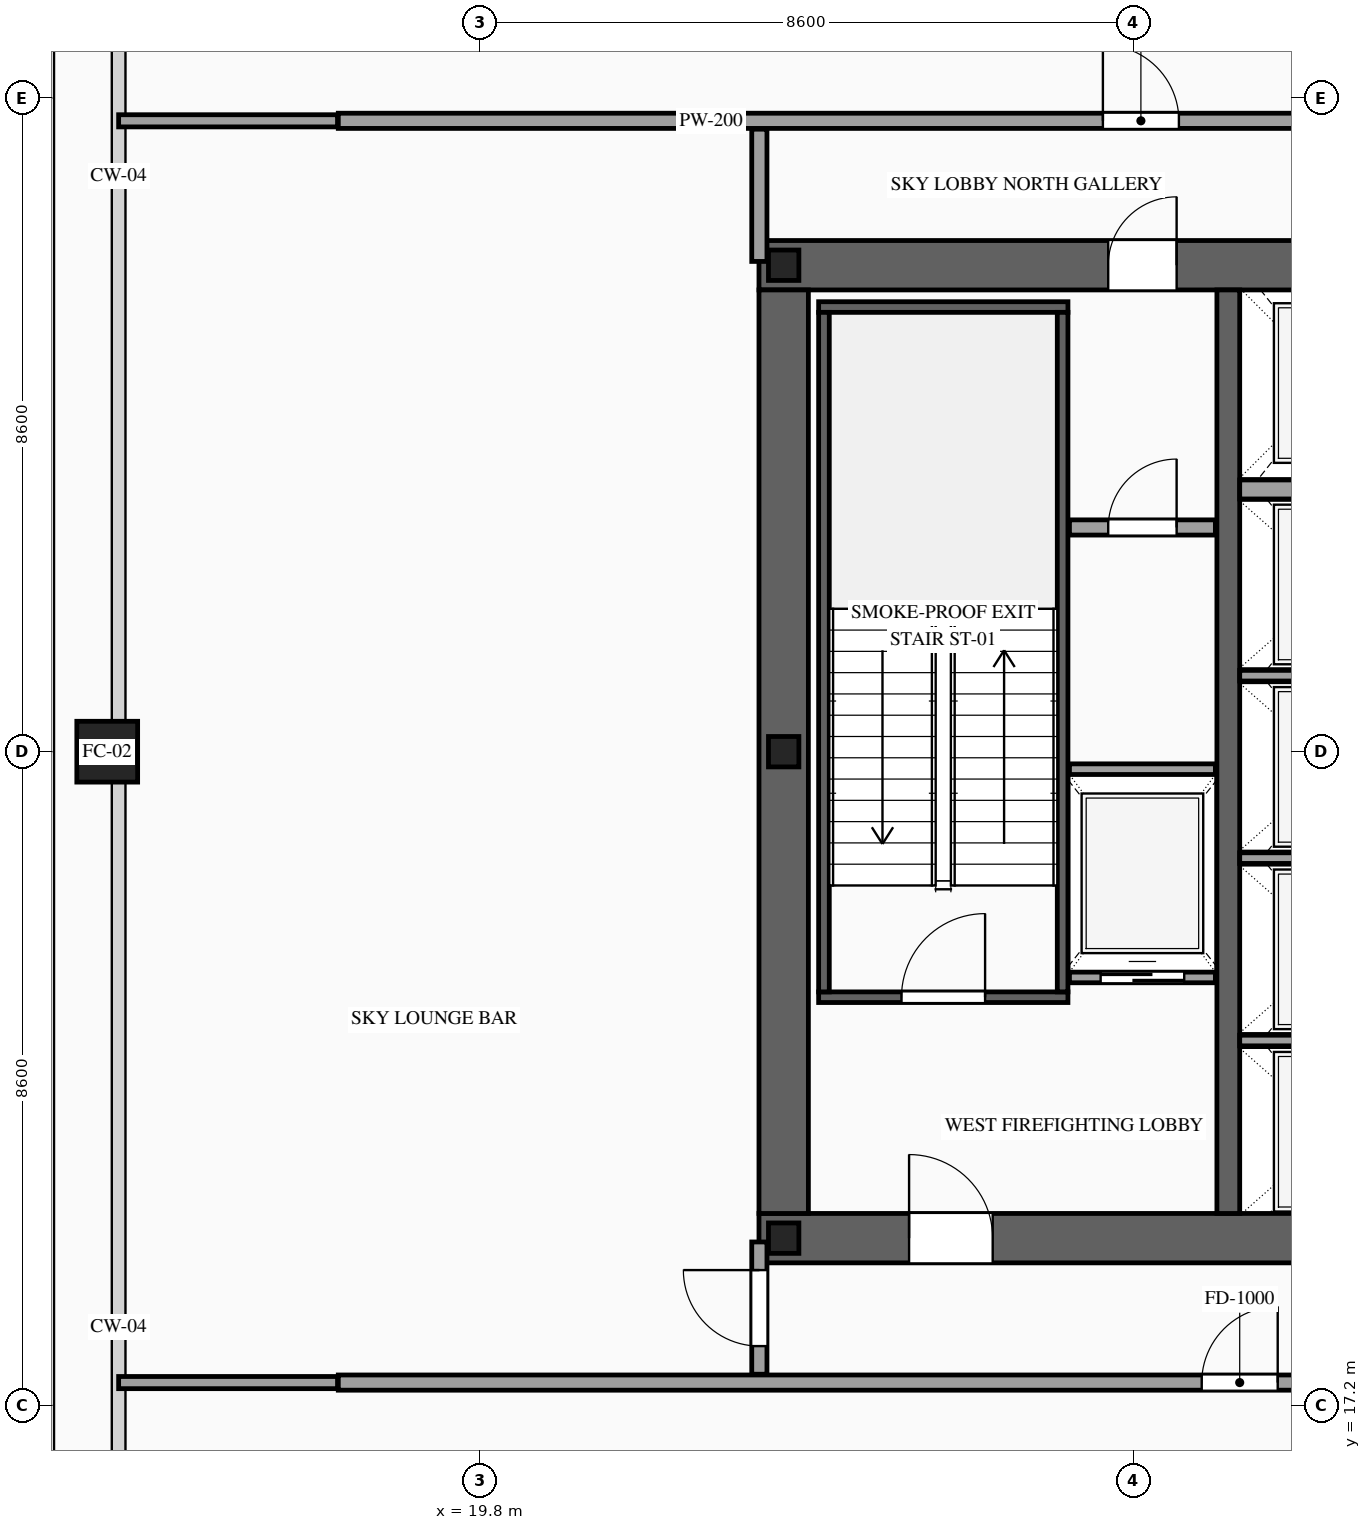
"""IFC4 building model, lengths in metres.
Left out: names, types, materials, properties, quantities, classifications, styles, units other than length and angle.
Written with IfcOpenShell. Run it as: python <this file> out.ifc"""

import sys

from ifc_helpers import new_model, si_unit, direction, frame, frame_2d, origin, origin_2d, place, context, subcontext, project, spatial, rectangle, hollow_rectangle, i_section, extrude, source, transform, mapped, element, fill, save


model = new_model("IFC4")
c1 = context("Model", 3, precision=1e-05, world=origin(), true_north=direction((0.0, 1.0)))
c2 = subcontext(c1, "Body", "Model", "MODEL_VIEW")
j1 = project(units=[si_unit("LENGTHUNIT", "METRE"), si_unit("PLANEANGLEUNIT", "RADIAN")], contexts=[c1])
p1 = place(None, origin())
s1 = spatial("IfcSite", under=j1, at=p1, CompositionType="ELEMENT")
p2 = place(p1, origin())
s2 = spatial("IfcBuilding", under=s1, at=p2, CompositionType="ELEMENT")
p3 = place(p2, frame((0.0, 0.0, 166.8)))
s3 = spatial("IfcBuildingStorey", under=s2, at=p3, CompositionType="ELEMENT", Elevation=166.8)
p4 = place(p3, frame((23.475, 19.4, 0.0), z_axis=(0.0, 0.0, 1.0), x_axis=(1.0, 0.0, 0.0)))
e1 = element("IfcWall", 1, at=p4, inside=s3, PredefinedType="SHEAR", context=c2, shape_type="SweptSolid", body=[
    extrude(rectangle(XDim=27.05, YDim=0.65, at=frame_2d((13.525, 0.0))), origin(), (0.0, 0.0, 1.0), 4.8),
])
p5 = place(p4, frame((1.975, 0.0, 0.0)))
e2 = element("IfcOpeningElement", 2, at=p5, cuts=e1, PredefinedType="OPENING", context=c2, shape_type="SweptSolid", body=[
    extrude(rectangle(XDim=1.1, YDim=2.2, at=frame_2d((0.55, 1.1))), frame((0.0, 0.34, 0.0), z_axis=(0.0, -1.0, 0.0), x_axis=(1.0, 0.0, 0.0)), (0.0, 0.0, 1.0), 0.68),
])
p6 = place(p4, frame((9.875, 0.0, 0.0)))
e3 = element("IfcOpeningElement", 3, at=p6, cuts=e1, PredefinedType="OPENING", context=c2, shape_type="SweptSolid", body=[
    extrude(rectangle(XDim=1.1, YDim=2.2, at=frame_2d((0.55, 1.1))), frame((0.0, 0.34, 0.0), z_axis=(0.0, -1.0, 0.0), x_axis=(1.0, 0.0, 0.0)), (0.0, 0.0, 1.0), 0.68),
])
p7 = place(p4, frame((23.075, 0.0, 0.0)))
e4 = element("IfcOpeningElement", 4, at=p7, cuts=e1, PredefinedType="OPENING", context=c2, shape_type="SweptSolid", body=[
    extrude(rectangle(XDim=1.1, YDim=2.2, at=frame_2d((0.55, 1.1))), frame((0.0, 0.34, 0.0), z_axis=(0.0, -1.0, 0.0), x_axis=(1.0, 0.0, 0.0)), (0.0, 0.0, 1.0), 0.68),
])
p8 = place(p4, frame((19.695, 0.0, 0.0)))
e5 = element("IfcOpeningElement", 5, at=p8, cuts=e1, PredefinedType="OPENING", context=c2, shape_type="SweptSolid", body=[
    extrude(rectangle(XDim=0.9, YDim=2.15, at=frame_2d((0.45, 1.075))), frame((0.0, 0.34, 0.0), z_axis=(0.0, -1.0, 0.0), x_axis=(1.0, 0.0, 0.0)), (0.0, 0.0, 1.0), 0.68),
])
p9 = place(p4, frame((18.255, 0.0, 0.0)))
e6 = element("IfcOpeningElement", 6, at=p9, cuts=e1, PredefinedType="OPENING", context=c2, shape_type="SweptSolid", body=[
    extrude(rectangle(XDim=0.9, YDim=2.15, at=frame_2d((0.45, 1.075))), frame((0.0, 0.34, 0.0), z_axis=(0.0, -1.0, 0.0), x_axis=(1.0, 0.0, 0.0)), (0.0, 0.0, 1.0), 0.68),
])
p10 = place(p3, frame((23.475, 32.2, 0.0), z_axis=(0.0, 0.0, 1.0), x_axis=(1.0, 0.0, 0.0)))
e7 = element("IfcWall", 7, at=p10, inside=s3, PredefinedType="SHEAR", context=c2, shape_type="SweptSolid", body=[
    extrude(rectangle(XDim=27.05, YDim=0.65, at=frame_2d((13.525, 0.0))), origin(), (0.0, 0.0, 1.0), 4.8),
])
p11 = place(p10, frame((4.595, 0.0, 0.0)))
e8 = element("IfcOpeningElement", 8, at=p11, cuts=e7, PredefinedType="OPENING", context=c2, shape_type="SweptSolid", body=[
    extrude(rectangle(XDim=0.9, YDim=2.15, at=frame_2d((0.45, 1.075))), frame((0.0, 0.34, 0.0), z_axis=(0.0, -1.0, 0.0), x_axis=(1.0, 0.0, 0.0)), (0.0, 0.0, 1.0), 0.68),
])
p12 = place(p10, frame((9.875, 0.0, 0.0)))
e9 = element("IfcOpeningElement", 9, at=p12, cuts=e7, PredefinedType="OPENING", context=c2, shape_type="SweptSolid", body=[
    extrude(rectangle(XDim=1.1, YDim=2.2, at=frame_2d((0.55, 1.1))), frame((0.0, 0.34, 0.0), z_axis=(0.0, -1.0, 0.0), x_axis=(1.0, 0.0, 0.0)), (0.0, 0.0, 1.0), 0.68),
])
p13 = place(p10, frame((15.725, 0.0, 0.0)))
e10 = element("IfcOpeningElement", 10, at=p13, cuts=e7, PredefinedType="OPENING", context=c2, shape_type="SweptSolid", body=[
    extrude(rectangle(XDim=1.1, YDim=2.2, at=frame_2d((0.55, 1.1))), frame((0.0, 0.34, 0.0), z_axis=(0.0, -1.0, 0.0), x_axis=(1.0, 0.0, 0.0)), (0.0, 0.0, 1.0), 0.68),
])
p14 = place(p10, frame((18.825, 0.0, 0.0)))
e11 = element("IfcOpeningElement", 11, at=p14, cuts=e7, PredefinedType="OPENING", context=c2, shape_type="SweptSolid", body=[
    extrude(rectangle(XDim=1.1, YDim=2.2, at=frame_2d((0.55, 1.1))), frame((0.0, 0.34, 0.0), z_axis=(0.0, -1.0, 0.0), x_axis=(1.0, 0.0, 0.0)), (0.0, 0.0, 1.0), 0.68),
])
m1 = source(origin(), c2, "Body", "SweptSolid", [
    extrude(rectangle(XDim=12.15, YDim=0.65, at=frame_2d((6.075, 0.0))), origin(), (0.0, 0.0, 1.0), 4.8),
])
p15 = place(p3, frame((23.8, 19.725, 0.0), z_axis=(0.0, 0.0, 1.0), x_axis=(0.0, 1.0, 0.0)))
e12 = element("IfcWall", 12, at=p15, inside=s3, PredefinedType="SHEAR", context=c2, shape_type="MappedRepresentation", body=[
    mapped(m1, transform((0.0, 0.0, 0.0), scale=1.0)),
])
m2 = source(origin(), c2, "Body", "SweptSolid", [
    extrude(rectangle(XDim=12.15, YDim=0.3, at=frame_2d((6.075, 0.0))), origin(), (0.0, 0.0, 1.0), 4.8),
])
p16 = place(p3, frame((29.65, 19.725, 0.0), z_axis=(0.0, 0.0, 1.0), x_axis=(0.0, 1.0, 0.0)))
e13 = element("IfcWall", 13, at=p16, inside=s3, PredefinedType="SOLIDWALL", context=c2, shape_type="MappedRepresentation", body=[
    mapped(m2, transform((0.0, 0.0, 0.0), scale=1.0)),
])
m3 = source(origin(), c2, "Body", "SweptSolid", [
    extrude(i_section(OverallWidth=0.4, OverallDepth=0.4, WebThickness=0.013, FlangeThickness=0.021, at=origin_2d()), origin(), (0.0, 0.0, 1.0), 4.8),
])
for number, where, z_axis, x_axis in (
    (14, (23.8, 19.4, 0.0), (0.0, 0.0, 1.0), (1.0, 0.0, 0.0)),
    (15, (23.8, 25.8, 0.0), (0.0, 0.0, 1.0), (1.0, 0.0, 0.0)),
    (16, (23.8, 32.2, 0.0), (0.0, 0.0, 1.0), (1.0, 0.0, 0.0)),
):
    element("IfcColumn", number, at=place(p3, frame(where, z_axis=z_axis, x_axis=x_axis)), inside=s3, PredefinedType="COLUMN", context=c2, shape_type="MappedRepresentation", body=[
        mapped(m3, transform((0.0, 0.0, 0.0), scale=1.0)),
    ])
m4 = source(origin(), c2, "Body", "SweptSolid", [
    extrude(hollow_rectangle(XDim=0.8, YDim=0.8, WallThickness=0.036, at=origin_2d()), origin(), (0.0, 0.0, 1.0), 4.8),
])
p17 = place(p3, frame((14.9, 25.8, 0.0), z_axis=(0.0, 0.0, 1.0), x_axis=(1.0, 0.0, 0.0)))
e17 = element("IfcColumn", 17, at=p17, inside=s3, PredefinedType="COLUMN", context=c2, shape_type="MappedRepresentation", body=[
    mapped(m4, transform((0.0, 0.0, 0.0), scale=1.0)),
])
p18 = place(p3, frame((27.56, 22.83, 0.0), z_axis=(0.0, 0.0, 1.0), x_axis=(1.0, 0.0, 0.0)))
e18 = element("IfcWall", 18, at=p18, inside=s3, PredefinedType="SOLIDWALL", context=c2, shape_type="SweptSolid", body=[
    extrude(rectangle(XDim=1.92, YDim=0.14, at=frame_2d((0.96, 0.0))), origin(), (0.0, 0.0, 1.0), 4.5),
])
p19 = place(p18, frame((0.41, 0.0, 0.0)))
e19 = element("IfcOpeningElement", 19, at=p19, cuts=e18, PredefinedType="OPENING", context=c2, shape_type="SweptSolid", body=[
    extrude(rectangle(XDim=1.1, YDim=2.2, at=frame_2d((0.55, 1.1))), frame((0.0, 0.085, 0.0), z_axis=(0.0, -1.0, 0.0), x_axis=(1.0, 0.0, 0.0)), (0.0, 0.0, 1.0), 0.17),
])
m5 = source(origin(), c2, "Body", "SweptSolid", [
    extrude(rectangle(XDim=1.92, YDim=0.14, at=frame_2d((0.96, 0.0))), origin(), (0.0, 0.0, 1.0), 4.5),
])
p20 = place(p3, frame((27.56, 25.57, 0.0), z_axis=(0.0, 0.0, 1.0), x_axis=(1.0, 0.0, 0.0)))
e20 = element("IfcWall", 20, at=p20, inside=s3, PredefinedType="SOLIDWALL", context=c2, shape_type="MappedRepresentation", body=[
    mapped(m5, transform((0.0, 0.0, 0.0), scale=1.0)),
])
m6 = source(origin(), c2, "Body", "SweptSolid", [
    extrude(rectangle(XDim=2.5, YDim=0.14, at=frame_2d((1.25, 0.0))), origin(), (0.0, 0.0, 1.0), 4.5),
])
for number, where, z_axis, x_axis in (
    (21, (29.8, 22.0, 0.0), (0.0, 0.0, 1.0), (1.0, 0.0, 0.0)),
    (22, (29.8, 24.4, 0.0), (0.0, 0.0, 1.0), (1.0, 0.0, 0.0)),
    (23, (29.8, 26.8, 0.0), (0.0, 0.0, 1.0), (1.0, 0.0, 0.0)),
):
    element("IfcWall", number, at=place(p3, frame(where, z_axis=z_axis, x_axis=x_axis)), inside=s3, PredefinedType="SOLIDWALL", context=c2, shape_type="MappedRepresentation", body=[
        mapped(m6, transform((0.0, 0.0, 0.0), scale=1.0)),
    ])
m7 = source(origin(), c2, "Body", "SweptSolid", [
    extrude(rectangle(XDim=2.5, YDim=0.25, at=frame_2d((1.25, 0.0))), origin(), (0.0, 0.0, 1.0), 4.5),
])
p21 = place(p3, frame((29.8, 29.25, 0.0), z_axis=(0.0, 0.0, 1.0), x_axis=(1.0, 0.0, 0.0)))
e24 = element("IfcWall", 24, at=p21, inside=s3, PredefinedType="SOLIDWALL", context=c2, shape_type="MappedRepresentation", body=[
    mapped(m7, transform((0.0, 0.0, 0.0), scale=1.0)),
])
p22 = place(p3, frame((24.26, 22.57, 0.0), z_axis=(0.0, 0.0, 1.0), x_axis=(1.0, 0.0, 0.0)))
e25 = element("IfcWall", 25, at=p22, inside=s3, PredefinedType="SOLIDWALL", context=c2, shape_type="SweptSolid", body=[
    extrude(rectangle(XDim=3.28, YDim=0.14, at=frame_2d((1.64, 0.0))), origin(), (0.0, 0.0, 1.0), 4.5),
])
p23 = place(p22, frame((1.09, 0.0, 0.0)))
e26 = element("IfcOpeningElement", 26, at=p23, cuts=e25, PredefinedType="OPENING", context=c2, shape_type="SweptSolid", body=[
    extrude(rectangle(XDim=1.1, YDim=2.2, at=frame_2d((0.55, 1.1))), frame((0.0, 0.085, 0.0), z_axis=(0.0, -1.0, 0.0), x_axis=(1.0, 0.0, 0.0)), (0.0, 0.0, 1.0), 0.17),
])
m8 = source(origin(), c2, "Body", "SweptSolid", [
    extrude(rectangle(XDim=3.28, YDim=0.14, at=frame_2d((1.64, 0.0))), origin(), (0.0, 0.0, 1.0), 4.5),
])
p24 = place(p3, frame((24.26, 31.65, 0.0), z_axis=(0.0, 0.0, 1.0), x_axis=(1.0, 0.0, 0.0)))
e27 = element("IfcWall", 27, at=p24, inside=s3, PredefinedType="SOLIDWALL", context=c2, shape_type="MappedRepresentation", body=[
    mapped(m8, transform((0.0, 0.0, 0.0), scale=1.0)),
])
m9 = source(origin(), c2, "Body", "SweptSolid", [
    extrude(rectangle(XDim=8.94, YDim=0.14, at=frame_2d((4.47, 0.0))), origin(), (0.0, 0.0, 1.0), 4.5),
])
for number, where, z_axis, x_axis in (
    (28, (24.33, 22.64, 0.0), (0.0, 0.0, 1.0), (0.0, 1.0, 0.0)),
    (29, (27.47, 22.64, 0.0), (0.0, 0.0, 1.0), (0.0, 1.0, 0.0)),
):
    element("IfcWall", number, at=place(p3, frame(where, z_axis=z_axis, x_axis=x_axis)), inside=s3, PredefinedType="SOLIDWALL", context=c2, shape_type="MappedRepresentation", body=[
        mapped(m9, transform((0.0, 0.0, 0.0), scale=1.0)),
    ])
p25 = place(p3, frame((27.56, 28.75, 0.0), z_axis=(0.0, 0.0, 1.0), x_axis=(1.0, 0.0, 0.0)))
e30 = element("IfcWall", 30, at=p25, inside=s3, PredefinedType="PARTITIONING", context=c2, shape_type="SweptSolid", body=[
    extrude(rectangle(XDim=1.92, YDim=0.2, at=frame_2d((0.96, 0.0))), origin(), (0.0, 0.0, 1.0), 4.5),
])
p26 = place(p25, frame((0.51, 0.0, 0.0)))
e31 = element("IfcOpeningElement", 31, at=p26, cuts=e30, PredefinedType="OPENING", context=c2, shape_type="SweptSolid", body=[
    extrude(rectangle(XDim=0.9, YDim=2.15, at=frame_2d((0.45, 1.075))), frame((0.0, 0.115, 0.0), z_axis=(0.0, -1.0, 0.0), x_axis=(1.0, 0.0, 0.0)), (0.0, 0.0, 1.0), 0.23),
])
p27 = place(p3, frame((17.94, 17.5, 0.0), z_axis=(0.0, 0.0, 1.0), x_axis=(1.0, 0.0, 0.0)))
e32 = element("IfcWall", 32, at=p27, inside=s3, PredefinedType="PARTITIONING", context=c2, shape_type="SweptSolid", body=[
    extrude(rectangle(XDim=18.86, YDim=0.2, at=frame_2d((9.43, 0.0))), origin(), (0.0, 0.0, 1.0), 4.5),
])
p28 = place(p27, frame((11.36, 0.0, 0.0)))
e33 = element("IfcOpeningElement", 33, at=p28, cuts=e32, PredefinedType="OPENING", context=c2, shape_type="SweptSolid", body=[
    extrude(rectangle(XDim=1.0, YDim=2.2, at=frame_2d((0.5, 1.1))), frame((0.0, 0.115, 0.0), z_axis=(0.0, -1.0, 0.0), x_axis=(1.0, 0.0, 0.0)), (0.0, 0.0, 1.0), 0.23),
])
p29 = place(p3, frame((23.48, 17.61, 0.0), z_axis=(0.0, 0.0, 1.0), x_axis=(0.0, 1.0, 0.0)))
e34 = element("IfcWall", 34, at=p29, inside=s3, PredefinedType="PARTITIONING", context=c2, shape_type="SweptSolid", body=[
    extrude(rectangle(XDim=1.74, YDim=0.2, at=frame_2d((0.87, 0.0))), origin(), (0.0, 0.0, 1.0), 4.5),
])
p30 = place(p29, frame((0.37, 0.0, 0.0)))
e35 = element("IfcOpeningElement", 35, at=p30, cuts=e34, PredefinedType="OPENING", context=c2, shape_type="SweptSolid", body=[
    extrude(rectangle(XDim=1.0, YDim=2.2, at=frame_2d((0.5, 1.1))), frame((0.0, 0.115, 0.0), z_axis=(0.0, -1.0, 0.0), x_axis=(1.0, 0.0, 0.0)), (0.0, 0.0, 1.0), 0.23),
])
m10 = source(origin(), c2, "Body", "SweptSolid", [
    extrude(rectangle(XDim=1.74, YDim=0.2, at=frame_2d((0.87, 0.0))), origin(), (0.0, 0.0, 1.0), 4.5),
])
p31 = place(p3, frame((23.48, 32.25, 0.0), z_axis=(0.0, 0.0, 1.0), x_axis=(0.0, 1.0, 0.0)))
e36 = element("IfcWall", 36, at=p31, inside=s3, PredefinedType="PARTITIONING", context=c2, shape_type="MappedRepresentation", body=[
    mapped(m10, transform((0.0, 0.0, 0.0), scale=1.0)),
])
m11 = source(origin(), c2, "Body", "SweptSolid", [
    extrude(rectangle(XDim=2.88, YDim=0.16, at=frame_2d((1.44, 0.0))), origin(), (0.0, 0.0, 1.0), 4.5),
])
for number, where, z_axis, x_axis in (
    (37, (15.05, 17.5, 0.0), (0.0, 0.0, 1.0), (1.0, 0.0, 0.0)),
    (38, (15.05, 34.1, 0.0), (0.0, 0.0, 1.0), (1.0, 0.0, 0.0)),
):
    element("IfcWall", number, at=place(p3, frame(where, z_axis=z_axis, x_axis=x_axis)), inside=s3, PredefinedType="PARTITIONING", context=c2, shape_type="MappedRepresentation", body=[
        mapped(m11, transform((0.0, 0.0, 0.0), scale=1.0)),
    ])
p32 = place(p3, frame((17.94, 34.1, 0.0), z_axis=(0.0, 0.0, 1.0), x_axis=(1.0, 0.0, 0.0)))
e39 = element("IfcWall", 39, at=p32, inside=s3, PredefinedType="PARTITIONING", context=c2, shape_type="SweptSolid", body=[
    extrude(rectangle(XDim=15.46, YDim=0.2, at=frame_2d((7.73, 0.0))), origin(), (0.0, 0.0, 1.0), 4.5),
])
p33 = place(p32, frame((10.06, 0.0, 0.0)))
e40 = element("IfcOpeningElement", 40, at=p33, cuts=e39, PredefinedType="OPENING", context=c2, shape_type="SweptSolid", body=[
    extrude(rectangle(XDim=1.0, YDim=2.2, at=frame_2d((0.5, 1.1))), frame((0.0, 0.115, 0.0), z_axis=(0.0, -1.0, 0.0), x_axis=(1.0, 0.0, 0.0)), (0.0, 0.0, 1.0), 0.23),
])
m12 = source(origin(), c2, "Body", "SweptSolid", [
    extrude(rectangle(XDim=1.1, YDim=2.2, at=frame_2d((0.55, 1.1))), frame((0.0, 0.025, 0.0), z_axis=(0.0, -1.0, 0.0), x_axis=(1.0, 0.0, 0.0)), (0.0, 0.0, 1.0), 0.05),
])
p34 = place(p19, origin())
e41 = element("IfcDoor", 41, at=p34, inside=s3, OperationType="SLIDING_TO_LEFT", PredefinedType="DOOR", context=c2, shape_type="MappedRepresentation", body=[
    mapped(m12, transform((0.0, 0.0, 0.0), scale=1.0)),
])
fill(e19, e41)
m13 = source(origin(), c2, "Body", "SweptSolid", [
    extrude(rectangle(XDim=1.1, YDim=2.2, at=frame_2d((0.55, 1.1))), frame((0.0, 0.025, 0.0), z_axis=(0.0, -1.0, 0.0), x_axis=(1.0, 0.0, 0.0)), (0.0, 0.0, 1.0), 0.05),
])
p35 = place(p23, origin())
e42 = element("IfcDoor", 42, at=p35, inside=s3, OperationType="SINGLE_SWING_RIGHT", PredefinedType="DOOR", context=c2, shape_type="MappedRepresentation", body=[
    mapped(m13, transform((0.0, 0.0, 0.0), scale=1.0)),
])
fill(e26, e42)
p36 = place(p5, origin())
e43 = element("IfcDoor", 43, at=p36, inside=s3, OperationType="SINGLE_SWING_LEFT", PredefinedType="DOOR", context=c2, shape_type="MappedRepresentation", body=[
    mapped(m13, transform((0.0, 0.0, 0.0), scale=1.0)),
])
fill(e2, e43)
m14 = source(origin(), c2, "Body", "SweptSolid", [
    extrude(rectangle(XDim=0.9, YDim=2.15, at=frame_2d((0.45, 1.075))), frame((0.0, 0.025, 0.0), z_axis=(0.0, -1.0, 0.0), x_axis=(1.0, 0.0, 0.0)), (0.0, 0.0, 1.0), 0.05),
])
p37 = place(p11, origin())
e44 = element("IfcDoor", 44, at=p37, inside=s3, OperationType="SINGLE_SWING_RIGHT", PredefinedType="DOOR", context=c2, shape_type="MappedRepresentation", body=[
    mapped(m14, transform((0.0, 0.0, 0.0), scale=1.0)),
])
fill(e8, e44)
p38 = place(p26, origin())
e45 = element("IfcDoor", 45, at=p38, inside=s3, OperationType="SINGLE_SWING_RIGHT", PredefinedType="DOOR", context=c2, shape_type="MappedRepresentation", body=[
    mapped(m14, transform((0.0, 0.0, 0.0), scale=1.0)),
])
fill(e31, e45)
m15 = source(origin(), c2, "Body", "SweptSolid", [
    extrude(rectangle(XDim=1.0, YDim=2.2, at=frame_2d((0.5, 1.1))), frame((0.0, 0.025, 0.0), z_axis=(0.0, -1.0, 0.0), x_axis=(1.0, 0.0, 0.0)), (0.0, 0.0, 1.0), 0.05),
])
p39 = place(p28, origin())
e46 = element("IfcDoor", 46, at=p39, inside=s3, OperationType="SINGLE_SWING_RIGHT", PredefinedType="DOOR", context=c2, shape_type="MappedRepresentation", body=[
    mapped(m15, transform((0.0, 0.0, 0.0), scale=1.0)),
])
fill(e33, e46)
p40 = place(p30, origin())
e47 = element("IfcDoor", 47, at=p40, inside=s3, OperationType="SINGLE_SWING_RIGHT", PredefinedType="DOOR", context=c2, shape_type="MappedRepresentation", body=[
    mapped(m15, transform((0.0, 0.0, 0.0), scale=1.0)),
])
fill(e35, e47)
p41 = place(p33, origin())
e48 = element("IfcDoor", 48, at=p41, inside=s3, OperationType="SINGLE_SWING_LEFT", PredefinedType="DOOR", context=c2, shape_type="MappedRepresentation", body=[
    mapped(m15, transform((0.0, 0.0, 0.0), scale=1.0)),
])
fill(e40, e48)
save(model, sys.argv[1])
